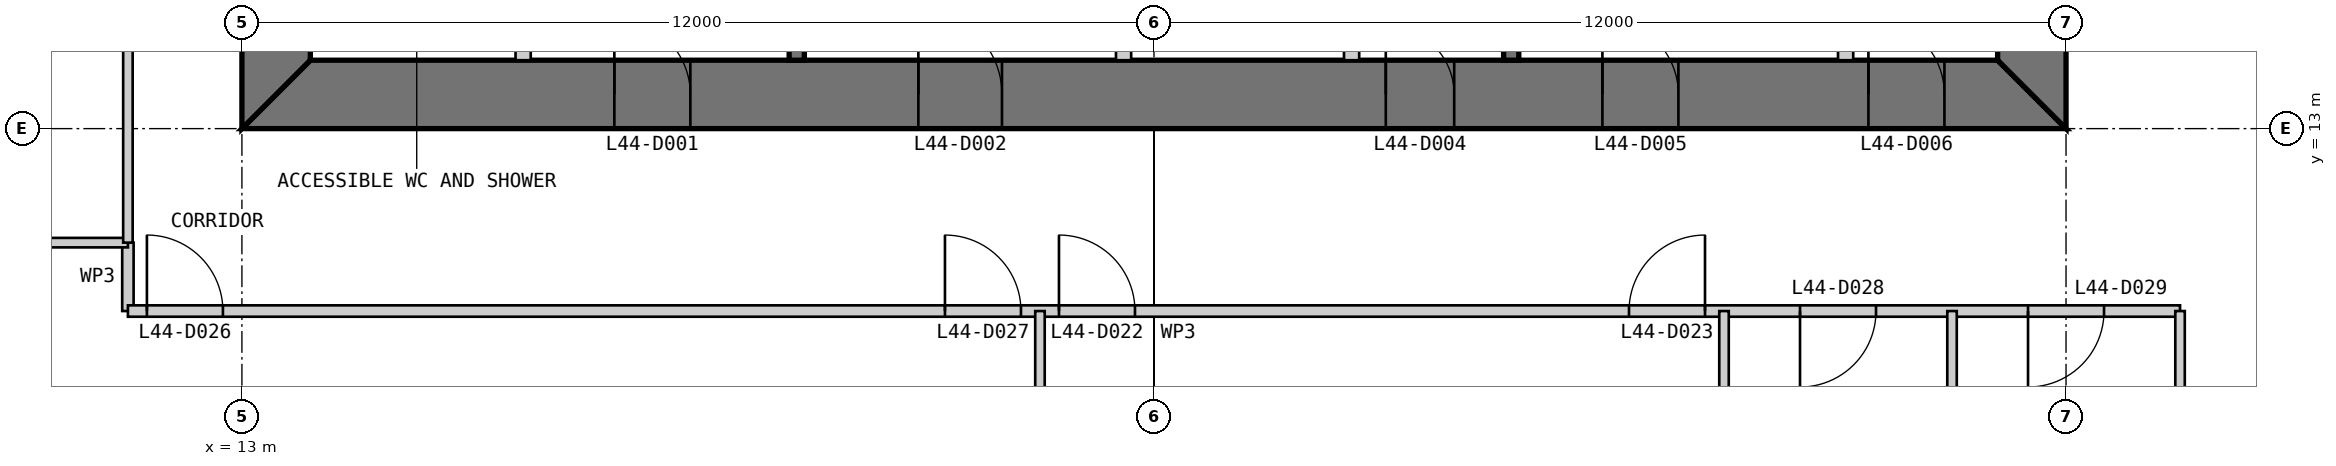
"""IFC4 building model, lengths in metres.
Left out: names, types, materials, properties, quantities, classifications, styles, units other than length and angle.
Written with IfcOpenShell. Run it as: python <this file> out.ifc"""

import sys

from ifc_helpers import new_model, si_unit, direction, frame, frame_2d, origin, place, context, subcontext, project, spatial, polyline, rectangle, outline, extrude, element, fill, save


model = new_model("IFC4")
c1 = context("Model", 3, precision=1e-05, world=origin(), true_north=direction((0.0, 1.0)))
c2 = subcontext(c1, "Body", "Model", "MODEL_VIEW")
j1 = project(units=[si_unit("LENGTHUNIT", "METRE"), si_unit("PLANEANGLEUNIT", "RADIAN")], contexts=[c1])
p1 = place(None, origin())
s1 = spatial("IfcSite", under=j1, at=p1, CompositionType="ELEMENT")
p2 = place(p1, origin())
s2 = spatial("IfcBuilding", under=s1, at=p2, CompositionType="ELEMENT")
p3 = place(p2, frame((0.0, 0.0, 189.8)))
s3 = spatial("IfcBuildingStorey", under=s2, at=p3, CompositionType="ELEMENT", Elevation=189.8)
p4 = place(p3, frame((13.0, 13.45, 0.0), z_axis=(0.0, 0.0, 1.0), x_axis=(1.0, 0.0, 0.0)))
e1 = element("IfcWall", 1, at=p4, inside=s3, PredefinedType="SHEAR", context=c2, shape_type="SweptSolid", body=[
    extrude(outline(polyline([(0.0, -0.45), (24.0, -0.45), (23.1, 0.45), (0.9, 0.45), (0.0, -0.45)])), origin(), (0.0, 0.0, 1.0), 4.0),
])
p5 = place(p4, frame((4.9, 0.0, 0.0)))
e2 = element("IfcOpeningElement", 2, at=p5, cuts=e1, PredefinedType="OPENING", context=c2, shape_type="SweptSolid", body=[
    extrude(rectangle(XDim=1.0, YDim=2.2, at=frame_2d((0.5, 1.1))), frame((0.0, 0.46, 0.0), z_axis=(0.0, -1.0, 0.0), x_axis=(1.0, 0.0, 0.0)), (0.0, 0.0, 1.0), 0.92),
])
p6 = place(p4, frame((8.9, 0.0, 0.0)))
e3 = element("IfcOpeningElement", 3, at=p6, cuts=e1, PredefinedType="OPENING", context=c2, shape_type="SweptSolid", body=[
    extrude(rectangle(XDim=1.1, YDim=2.2, at=frame_2d((0.55, 1.1))), frame((0.0, 0.46, 0.0), z_axis=(0.0, -1.0, 0.0), x_axis=(1.0, 0.0, 0.0)), (0.0, 0.0, 1.0), 0.92),
])
p7 = place(p4, frame((15.05, 0.0, 0.0)))
e4 = element("IfcOpeningElement", 4, at=p7, cuts=e1, PredefinedType="OPENING", context=c2, shape_type="SweptSolid", body=[
    extrude(rectangle(XDim=0.9, YDim=2.2, at=frame_2d((0.45, 1.1))), frame((0.0, 0.46, 0.0), z_axis=(0.0, -1.0, 0.0), x_axis=(1.0, 0.0, 0.0)), (0.0, 0.0, 1.0), 0.92),
])
p8 = place(p4, frame((17.9, 0.0, 0.0)))
e5 = element("IfcOpeningElement", 5, at=p8, cuts=e1, PredefinedType="OPENING", context=c2, shape_type="SweptSolid", body=[
    extrude(rectangle(XDim=1.0, YDim=2.2, at=frame_2d((0.5, 1.1))), frame((0.0, 0.46, 0.0), z_axis=(0.0, -1.0, 0.0), x_axis=(1.0, 0.0, 0.0)), (0.0, 0.0, 1.0), 0.92),
])
p9 = place(p4, frame((21.4, 0.0, 0.0)))
e6 = element("IfcOpeningElement", 6, at=p9, cuts=e1, PredefinedType="OPENING", context=c2, shape_type="SweptSolid", body=[
    extrude(rectangle(XDim=1.0, YDim=2.2, at=frame_2d((0.5, 1.1))), frame((0.0, 0.46, 0.0), z_axis=(0.0, -1.0, 0.0), x_axis=(1.0, 0.0, 0.0)), (0.0, 0.0, 1.0), 0.92),
])
p10 = place(p3, frame((36.55, 13.9, 0.0), z_axis=(0.0, 0.0, 1.0), x_axis=(0.0, 1.0, 0.0)))
e7 = element("IfcWall", 7, at=p10, inside=s3, PredefinedType="SHEAR", context=c2, shape_type="SweptSolid", body=[
    extrude(outline(polyline([(-0.9, -0.45), (23.1, -0.45), (22.2, 0.45), (0.0, 0.45), (-0.9, -0.45)])), origin(), (0.0, 0.0, 1.0), 4.0),
])
p11 = place(p10, frame((20.2, 0.0, 0.0)))
e8 = element("IfcOpeningElement", 8, at=p11, cuts=e7, PredefinedType="OPENING", context=c2, shape_type="SweptSolid", body=[
    extrude(rectangle(XDim=1.0, YDim=2.2, at=frame_2d((0.5, 1.1))), frame((0.0, 0.46, 0.0), z_axis=(0.0, -1.0, 0.0), x_axis=(1.0, 0.0, 0.0)), (0.0, 0.0, 1.0), 0.92),
])
p12 = place(p10, frame((17.25, 0.0, 0.0)))
e9 = element("IfcOpeningElement", 9, at=p12, cuts=e7, PredefinedType="OPENING", context=c2, shape_type="SweptSolid", body=[
    extrude(rectangle(XDim=0.9, YDim=2.2, at=frame_2d((0.45, 1.1))), frame((0.0, 0.46, 0.0), z_axis=(0.0, -1.0, 0.0), x_axis=(1.0, 0.0, 0.0)), (0.0, 0.0, 1.0), 0.92),
])
p13 = place(p3, frame((13.45, 36.1, 0.0), z_axis=(0.0, 0.0, 1.0), x_axis=(0.0, -1.0, 0.0)))
e10 = element("IfcWall", 10, at=p13, inside=s3, PredefinedType="SHEAR", context=c2, shape_type="SweptSolid", body=[
    extrude(outline(polyline([(-0.9, -0.45), (23.1, -0.45), (22.2, 0.45), (0.0, 0.45), (-0.9, -0.45)])), origin(), (0.0, 0.0, 1.0), 4.0),
])
p14 = place(p13, frame((20.2, 0.0, 0.0)))
e11 = element("IfcOpeningElement", 11, at=p14, cuts=e10, PredefinedType="OPENING", context=c2, shape_type="SweptSolid", body=[
    extrude(rectangle(XDim=1.0, YDim=2.2, at=frame_2d((0.5, 1.1))), frame((0.0, 0.46, 0.0), z_axis=(0.0, -1.0, 0.0), x_axis=(1.0, 0.0, 0.0)), (0.0, 0.0, 1.0), 0.92),
])
p15 = place(p13, frame((17.25, 0.0, 0.0)))
e12 = element("IfcOpeningElement", 12, at=p15, cuts=e10, PredefinedType="OPENING", context=c2, shape_type="SweptSolid", body=[
    extrude(rectangle(XDim=0.9, YDim=2.2, at=frame_2d((0.45, 1.1))), frame((0.0, 0.46, 0.0), z_axis=(0.0, -1.0, 0.0), x_axis=(1.0, 0.0, 0.0)), (0.0, 0.0, 1.0), 0.92),
])
p16 = place(p3, frame((16.7, 13.9, 0.0), z_axis=(0.0, 0.0, 1.0), x_axis=(0.0, 1.0, 0.0)))
e13 = element("IfcWall", 13, at=p16, inside=s3, PredefinedType="PARTITIONING", context=c2, shape_type="SweptSolid", body=[
    extrude(rectangle(XDim=16.1, YDim=0.2, at=frame_2d((8.05, 0.0))), origin(), (0.0, 0.0, 1.0), 3.8),
])
p17 = place(p16, frame((7.95, 0.0, 0.0)))
e14 = element("IfcOpeningElement", 14, at=p17, cuts=e13, PredefinedType="OPENING", context=c2, shape_type="SweptSolid", body=[
    extrude(rectangle(XDim=0.9, YDim=2.2, at=frame_2d((0.45, 1.1))), frame((0.0, 0.11, 0.0), z_axis=(0.0, -1.0, 0.0), x_axis=(1.0, 0.0, 0.0)), (0.0, 0.0, 1.0), 0.22),
])
p18 = place(p16, frame((12.9, 0.0, 0.0)))
e15 = element("IfcOpeningElement", 15, at=p18, cuts=e13, PredefinedType="OPENING", context=c2, shape_type="SweptSolid", body=[
    extrude(rectangle(XDim=0.9, YDim=2.2, at=frame_2d((0.45, 1.1))), frame((0.0, 0.11, 0.0), z_axis=(0.0, -1.0, 0.0), x_axis=(1.0, 0.0, 0.0)), (0.0, 0.0, 1.0), 0.22),
])
p19 = place(p3, frame((20.3, 13.9, 0.0), z_axis=(0.0, 0.0, 1.0), x_axis=(0.0, 1.0, 0.0)))
e16 = element("IfcWall", 16, at=p19, inside=s3, PredefinedType="SOLIDWALL", context=c2, shape_type="SweptSolid", body=[
    extrude(rectangle(XDim=16.1, YDim=0.2, at=frame_2d((8.05, 0.0))), origin(), (0.0, 0.0, 1.0), 3.8),
])
p20 = place(p19, frame((7.85, 0.0, 0.0)))
e17 = element("IfcOpeningElement", 17, at=p20, cuts=e16, PredefinedType="OPENING", context=c2, shape_type="SweptSolid", body=[
    extrude(rectangle(XDim=0.9, YDim=2.2, at=frame_2d((0.45, 1.1))), frame((0.0, 0.11, 0.0), z_axis=(0.0, -1.0, 0.0), x_axis=(1.0, 0.0, 0.0)), (0.0, 0.0, 1.0), 0.22),
])
p21 = place(p19, frame((11.75, 0.0, 0.0)))
e18 = element("IfcOpeningElement", 18, at=p21, cuts=e16, PredefinedType="OPENING", context=c2, shape_type="SweptSolid", body=[
    extrude(rectangle(XDim=0.9, YDim=2.2, at=frame_2d((0.45, 1.1))), frame((0.0, 0.11, 0.0), z_axis=(0.0, -1.0, 0.0), x_axis=(1.0, 0.0, 0.0)), (0.0, 0.0, 1.0), 0.22),
])
p22 = place(p19, frame((14.55, 0.0, 0.0)))
e19 = element("IfcOpeningElement", 19, at=p22, cuts=e16, PredefinedType="OPENING", context=c2, shape_type="SweptSolid", body=[
    extrude(rectangle(XDim=0.9, YDim=2.2, at=frame_2d((0.45, 1.1))), frame((0.0, 0.11, 0.0), z_axis=(0.0, -1.0, 0.0), x_axis=(1.0, 0.0, 0.0)), (0.0, 0.0, 1.0), 0.22),
])
p23 = place(p3, frame((24.6, 13.9, 0.0), z_axis=(0.0, 0.0, 1.0), x_axis=(0.0, 1.0, 0.0)))
e20 = element("IfcWall", 20, at=p23, inside=s3, PredefinedType="PARTITIONING", context=c2, shape_type="SweptSolid", body=[
    extrude(rectangle(XDim=3.3, YDim=0.2, at=frame_2d((1.65, 0.0))), origin(), (0.0, 0.0, 1.0), 3.8),
])
p24 = place(p23, frame((0.9, 0.0, 0.0)))
e21 = element("IfcOpeningElement", 21, at=p24, cuts=e20, PredefinedType="OPENING", context=c2, shape_type="SweptSolid", body=[
    extrude(rectangle(XDim=1.1, YDim=2.2, at=frame_2d((0.55, 1.1))), frame((0.0, 0.11, 0.0), z_axis=(0.0, -1.0, 0.0), x_axis=(1.0, 0.0, 0.0)), (0.0, 0.0, 1.0), 0.22),
])
p25 = place(p3, frame((27.6, 13.9, 0.0), z_axis=(0.0, 0.0, 1.0), x_axis=(0.0, 1.0, 0.0)))
e22 = element("IfcWall", 22, at=p25, inside=s3, PredefinedType="PARTITIONING", context=c2, shape_type="SweptSolid", body=[
    extrude(rectangle(XDim=3.3, YDim=0.2, at=frame_2d((1.65, 0.0))), origin(), (0.0, 0.0, 1.0), 3.8),
])
p26 = place(p3, frame((29.7, 13.9, 0.0), z_axis=(0.0, 0.0, 1.0), x_axis=(0.0, 1.0, 0.0)))
e23 = element("IfcWall", 23, at=p26, inside=s3, PredefinedType="SOLIDWALL", context=c2, shape_type="SweptSolid", body=[
    extrude(rectangle(XDim=6.1, YDim=0.2, at=frame_2d((3.05, 0.0))), origin(), (0.0, 0.0, 1.0), 3.8),
])
p27 = place(p3, frame((34.1, 13.9, 0.0), z_axis=(0.0, 0.0, 1.0), x_axis=(0.0, 1.0, 0.0)))
e24 = element("IfcWall", 24, at=p27, inside=s3, PredefinedType="PARTITIONING", context=c2, shape_type="SweptSolid", body=[
    extrude(rectangle(XDim=6.1, YDim=0.2, at=frame_2d((3.05, 0.0))), origin(), (0.0, 0.0, 1.0), 3.8),
])
p28 = place(p3, frame((11.5, 11.5, 0.0), z_axis=(0.0, 0.0, 1.0), x_axis=(0.0, -1.0, 0.0)))
e25 = element("IfcWall", 25, at=p28, inside=s3, PredefinedType="PARTITIONING", context=c2, shape_type="SweptSolid", body=[
    extrude(rectangle(XDim=0.9, YDim=0.15, at=frame_2d((0.45, 0.0))), origin(), (0.0, 0.0, 1.0), 3.85),
])
p29 = place(p3, frame((11.5, 10.6, 0.0), z_axis=(0.0, 0.0, 1.0), x_axis=(1.0, 0.0, 0.0)))
e26 = element("IfcWall", 26, at=p29, inside=s3, PredefinedType="PARTITIONING", context=c2, shape_type="SweptSolid", body=[
    extrude(rectangle(XDim=27.0, YDim=0.15, at=frame_2d((13.5, 0.0))), origin(), (0.0, 0.0, 1.0), 3.85),
])
p30 = place(p29, frame((12.25, 0.0, 0.0)))
e27 = element("IfcOpeningElement", 27, at=p30, cuts=e26, PredefinedType="OPENING", context=c2, shape_type="SweptSolid", body=[
    extrude(rectangle(XDim=1.0, YDim=2.2, at=frame_2d((0.5, 1.1))), frame((0.0, 0.085, 0.0), z_axis=(0.0, -1.0, 0.0), x_axis=(1.0, 0.0, 0.0)), (0.0, 0.0, 1.0), 0.17),
])
p31 = place(p29, frame((19.75, 0.0, 0.0)))
e28 = element("IfcOpeningElement", 28, at=p31, cuts=e26, PredefinedType="OPENING", context=c2, shape_type="SweptSolid", body=[
    extrude(rectangle(XDim=1.0, YDim=2.2, at=frame_2d((0.5, 1.1))), frame((0.0, 0.085, 0.0), z_axis=(0.0, -1.0, 0.0), x_axis=(1.0, 0.0, 0.0)), (0.0, 0.0, 1.0), 0.17),
])
p32 = place(p29, frame((0.25, 0.0, 0.0)))
e29 = element("IfcOpeningElement", 29, at=p32, cuts=e26, PredefinedType="OPENING", context=c2, shape_type="SweptSolid", body=[
    extrude(rectangle(XDim=1.0, YDim=2.2, at=frame_2d((0.5, 1.1))), frame((0.0, 0.085, 0.0), z_axis=(0.0, -1.0, 0.0), x_axis=(1.0, 0.0, 0.0)), (0.0, 0.0, 1.0), 0.17),
])
p33 = place(p29, frame((10.75, 0.0, 0.0)))
e30 = element("IfcOpeningElement", 30, at=p33, cuts=e26, PredefinedType="OPENING", context=c2, shape_type="SweptSolid", body=[
    extrude(rectangle(XDim=1.0, YDim=2.2, at=frame_2d((0.5, 1.1))), frame((0.0, 0.085, 0.0), z_axis=(0.0, -1.0, 0.0), x_axis=(1.0, 0.0, 0.0)), (0.0, 0.0, 1.0), 0.17),
])
p34 = place(p29, frame((22.0, 0.0, 0.0)))
e31 = element("IfcOpeningElement", 31, at=p34, cuts=e26, PredefinedType="OPENING", context=c2, shape_type="SweptSolid", body=[
    extrude(rectangle(XDim=1.0, YDim=2.2, at=frame_2d((0.5, 1.1))), frame((0.0, 0.085, 0.0), z_axis=(0.0, -1.0, 0.0), x_axis=(1.0, 0.0, 0.0)), (0.0, 0.0, 1.0), 0.17),
])
p35 = place(p29, frame((25.0, 0.0, 0.0)))
e32 = element("IfcOpeningElement", 32, at=p35, cuts=e26, PredefinedType="OPENING", context=c2, shape_type="SweptSolid", body=[
    extrude(rectangle(XDim=1.0, YDim=2.2, at=frame_2d((0.5, 1.1))), frame((0.0, 0.085, 0.0), z_axis=(0.0, -1.0, 0.0), x_axis=(1.0, 0.0, 0.0)), (0.0, 0.0, 1.0), 0.17),
])
p36 = place(p3, frame((0.15, 11.5, 0.0), z_axis=(0.0, 0.0, 1.0), x_axis=(1.0, 0.0, 0.0)))
e33 = element("IfcWall", 33, at=p36, inside=s3, PredefinedType="PARTITIONING", context=c2, shape_type="SweptSolid", body=[
    extrude(rectangle(XDim=11.35, YDim=0.125, at=frame_2d((5.675, 0.0))), origin(), (0.0, 0.0, 1.0), 3.85),
])
p37 = place(p3, frame((23.5, 5.5, 0.0), z_axis=(0.0, 0.0, 1.0), x_axis=(0.0, 1.0, 0.0)))
e34 = element("IfcWall", 34, at=p37, inside=s3, PredefinedType="PARTITIONING", context=c2, shape_type="SweptSolid", body=[
    extrude(rectangle(XDim=5.1, YDim=0.125, at=frame_2d((2.55, 0.0))), origin(), (0.0, 0.0, 1.0), 3.85),
])
p38 = place(p3, frame((32.5, 0.15, 0.0), z_axis=(0.0, 0.0, 1.0), x_axis=(0.0, 1.0, 0.0)))
e35 = element("IfcWall", 35, at=p38, inside=s3, PredefinedType="PARTITIONING", context=c2, shape_type="SweptSolid", body=[
    extrude(rectangle(XDim=10.45, YDim=0.125, at=frame_2d((5.225, 0.0))), origin(), (0.0, 0.0, 1.0), 3.85),
])
p39 = place(p3, frame((35.5, 5.5, 0.0), z_axis=(0.0, 0.0, 1.0), x_axis=(0.0, 1.0, 0.0)))
e36 = element("IfcWall", 36, at=p39, inside=s3, PredefinedType="PARTITIONING", context=c2, shape_type="SweptSolid", body=[
    extrude(rectangle(XDim=5.1, YDim=0.125, at=frame_2d((2.55, 0.0))), origin(), (0.0, 0.0, 1.0), 3.85),
])
p40 = place(p3, frame((38.5, 0.15, 0.0), z_axis=(0.0, 0.0, 1.0), x_axis=(0.0, 1.0, 0.0)))
e37 = element("IfcWall", 37, at=p40, inside=s3, PredefinedType="PARTITIONING", context=c2, shape_type="SweptSolid", body=[
    extrude(rectangle(XDim=10.45, YDim=0.125, at=frame_2d((5.225, 0.0))), origin(), (0.0, 0.0, 1.0), 3.85),
])
p41 = place(p3, frame((11.5, 14.5, 0.0), z_axis=(0.0, 0.0, 1.0), x_axis=(0.0, -1.0, 0.0)))
e38 = element("IfcWall", 38, at=p41, inside=s3, PredefinedType="PARTITIONING", context=c2, shape_type="SweptSolid", body=[
    extrude(rectangle(XDim=3.0, YDim=0.125, at=frame_2d((1.5, 0.0))), origin(), (0.0, 0.0, 1.0), 3.85),
])
p42 = place(p5, origin())
e39 = element("IfcDoor", 39, at=p42, inside=s3, OperationType="SINGLE_SWING_LEFT", PredefinedType="DOOR", context=c2, shape_type="SweptSolid", body=[
    extrude(rectangle(XDim=1.0, YDim=2.2, at=frame_2d((0.5, 1.1))), frame((0.0, 0.025, 0.0), z_axis=(0.0, -1.0, 0.0), x_axis=(1.0, 0.0, 0.0)), (0.0, 0.0, 1.0), 0.05),
    extrude(outline(polyline([(0.0, 0.0), (0.04, 0.0), (0.04, 2.16), (0.96, 2.16), (0.96, 0.0), (1.0, 0.0), (1.0, 2.2), (0.0, 2.2), (0.0, 0.0)])), frame((0.0, 0.3, 0.0), z_axis=(0.0, -1.0, 0.0), x_axis=(1.0, 0.0, 0.0)), (0.0, 0.0, 1.0), 0.6),
])
fill(e2, e39)
p43 = place(p6, origin())
e40 = element("IfcDoor", 40, at=p43, inside=s3, OperationType="SINGLE_SWING_LEFT", PredefinedType="DOOR", context=c2, shape_type="SweptSolid", body=[
    extrude(rectangle(XDim=1.1, YDim=2.2, at=frame_2d((0.55, 1.1))), frame((0.0, 0.025, 0.0), z_axis=(0.0, -1.0, 0.0), x_axis=(1.0, 0.0, 0.0)), (0.0, 0.0, 1.0), 0.05),
    extrude(outline(polyline([(0.0, 0.0), (0.04, 0.0), (0.04, 2.16), (1.06, 2.16), (1.06, 0.0), (1.1, 0.0), (1.1, 2.2), (0.0, 2.2), (0.0, 0.0)])), frame((0.0, 0.3, 0.0), z_axis=(0.0, -1.0, 0.0), x_axis=(1.0, 0.0, 0.0)), (0.0, 0.0, 1.0), 0.6),
])
fill(e3, e40)
p44 = place(p7, origin())
e41 = element("IfcDoor", 41, at=p44, inside=s3, OperationType="SINGLE_SWING_LEFT", PredefinedType="DOOR", context=c2, shape_type="SweptSolid", body=[
    extrude(rectangle(XDim=0.9, YDim=2.2, at=frame_2d((0.45, 1.1))), frame((0.0, 0.025, 0.0), z_axis=(0.0, -1.0, 0.0), x_axis=(1.0, 0.0, 0.0)), (0.0, 0.0, 1.0), 0.05),
    extrude(outline(polyline([(0.0, 0.0), (0.04, 0.0), (0.04, 2.16), (0.86, 2.16), (0.86, 0.0), (0.9, 0.0), (0.9, 2.2), (0.0, 2.2), (0.0, 0.0)])), frame((0.0, 0.3, 0.0), z_axis=(0.0, -1.0, 0.0), x_axis=(1.0, 0.0, 0.0)), (0.0, 0.0, 1.0), 0.6),
])
fill(e4, e41)
p45 = place(p8, origin())
e42 = element("IfcDoor", 42, at=p45, inside=s3, OperationType="SINGLE_SWING_LEFT", PredefinedType="DOOR", context=c2, shape_type="SweptSolid", body=[
    extrude(rectangle(XDim=1.0, YDim=2.2, at=frame_2d((0.5, 1.1))), frame((0.0, 0.025, 0.0), z_axis=(0.0, -1.0, 0.0), x_axis=(1.0, 0.0, 0.0)), (0.0, 0.0, 1.0), 0.05),
    extrude(outline(polyline([(0.0, 0.0), (0.04, 0.0), (0.04, 2.16), (0.96, 2.16), (0.96, 0.0), (1.0, 0.0), (1.0, 2.2), (0.0, 2.2), (0.0, 0.0)])), frame((0.0, 0.3, 0.0), z_axis=(0.0, -1.0, 0.0), x_axis=(1.0, 0.0, 0.0)), (0.0, 0.0, 1.0), 0.6),
])
fill(e5, e42)
p46 = place(p9, origin())
e43 = element("IfcDoor", 43, at=p46, inside=s3, OperationType="SINGLE_SWING_LEFT", PredefinedType="DOOR", context=c2, shape_type="SweptSolid", body=[
    extrude(rectangle(XDim=1.0, YDim=2.2, at=frame_2d((0.5, 1.1))), frame((0.0, 0.025, 0.0), z_axis=(0.0, -1.0, 0.0), x_axis=(1.0, 0.0, 0.0)), (0.0, 0.0, 1.0), 0.05),
    extrude(outline(polyline([(0.0, 0.0), (0.04, 0.0), (0.04, 2.16), (0.96, 2.16), (0.96, 0.0), (1.0, 0.0), (1.0, 2.2), (0.0, 2.2), (0.0, 0.0)])), frame((0.0, 0.3, 0.0), z_axis=(0.0, -1.0, 0.0), x_axis=(1.0, 0.0, 0.0)), (0.0, 0.0, 1.0), 0.6),
])
fill(e6, e43)
p47 = place(p30, origin())
e44 = element("IfcDoor", 44, at=p47, inside=s3, OperationType="SINGLE_SWING_LEFT", PredefinedType="DOOR", context=c2, shape_type="SweptSolid", body=[
    extrude(rectangle(XDim=1.0, YDim=2.2, at=frame_2d((0.5, 1.1))), frame((0.0, 0.025, 0.0), z_axis=(0.0, -1.0, 0.0), x_axis=(1.0, 0.0, 0.0)), (0.0, 0.0, 1.0), 0.05),
])
fill(e27, e44)
p48 = place(p31, origin())
e45 = element("IfcDoor", 45, at=p48, inside=s3, OperationType="SINGLE_SWING_RIGHT", PredefinedType="DOOR", context=c2, shape_type="SweptSolid", body=[
    extrude(rectangle(XDim=1.0, YDim=2.2, at=frame_2d((0.5, 1.1))), frame((0.0, 0.025, 0.0), z_axis=(0.0, -1.0, 0.0), x_axis=(1.0, 0.0, 0.0)), (0.0, 0.0, 1.0), 0.05),
])
fill(e28, e45)
p49 = place(p32, origin())
e46 = element("IfcDoor", 46, at=p49, inside=s3, OperationType="SINGLE_SWING_LEFT", PredefinedType="DOOR", context=c2, shape_type="SweptSolid", body=[
    extrude(rectangle(XDim=1.0, YDim=2.2, at=frame_2d((0.5, 1.1))), frame((0.0, 0.025, 0.0), z_axis=(0.0, -1.0, 0.0), x_axis=(1.0, 0.0, 0.0)), (0.0, 0.0, 1.0), 0.05),
])
fill(e29, e46)
p50 = place(p33, origin())
e47 = element("IfcDoor", 47, at=p50, inside=s3, OperationType="SINGLE_SWING_LEFT", PredefinedType="DOOR", context=c2, shape_type="SweptSolid", body=[
    extrude(rectangle(XDim=1.0, YDim=2.2, at=frame_2d((0.5, 1.1))), frame((0.0, 0.025, 0.0), z_axis=(0.0, -1.0, 0.0), x_axis=(1.0, 0.0, 0.0)), (0.0, 0.0, 1.0), 0.05),
])
fill(e30, e47)
p51 = place(p34, frame((1.0, 0.0, 0.0), z_axis=(0.0, 0.0, 1.0), x_axis=(-1.0, 0.0, 0.0)))
e48 = element("IfcDoor", 48, at=p51, inside=s3, OperationType="SINGLE_SWING_RIGHT", PredefinedType="DOOR", context=c2, shape_type="SweptSolid", body=[
    extrude(rectangle(XDim=1.0, YDim=2.2, at=frame_2d((0.5, 1.1))), frame((0.0, 0.025, 0.0), z_axis=(0.0, -1.0, 0.0), x_axis=(1.0, 0.0, 0.0)), (0.0, 0.0, 1.0), 0.05),
])
fill(e31, e48)
p52 = place(p35, frame((1.0, 0.0, 0.0), z_axis=(0.0, 0.0, 1.0), x_axis=(-1.0, 0.0, 0.0)))
e49 = element("IfcDoor", 49, at=p52, inside=s3, OperationType="SINGLE_SWING_RIGHT", PredefinedType="DOOR", context=c2, shape_type="SweptSolid", body=[
    extrude(rectangle(XDim=1.0, YDim=2.2, at=frame_2d((0.5, 1.1))), frame((0.0, 0.025, 0.0), z_axis=(0.0, -1.0, 0.0), x_axis=(1.0, 0.0, 0.0)), (0.0, 0.0, 1.0), 0.05),
])
fill(e32, e49)
save(model, sys.argv[1])
